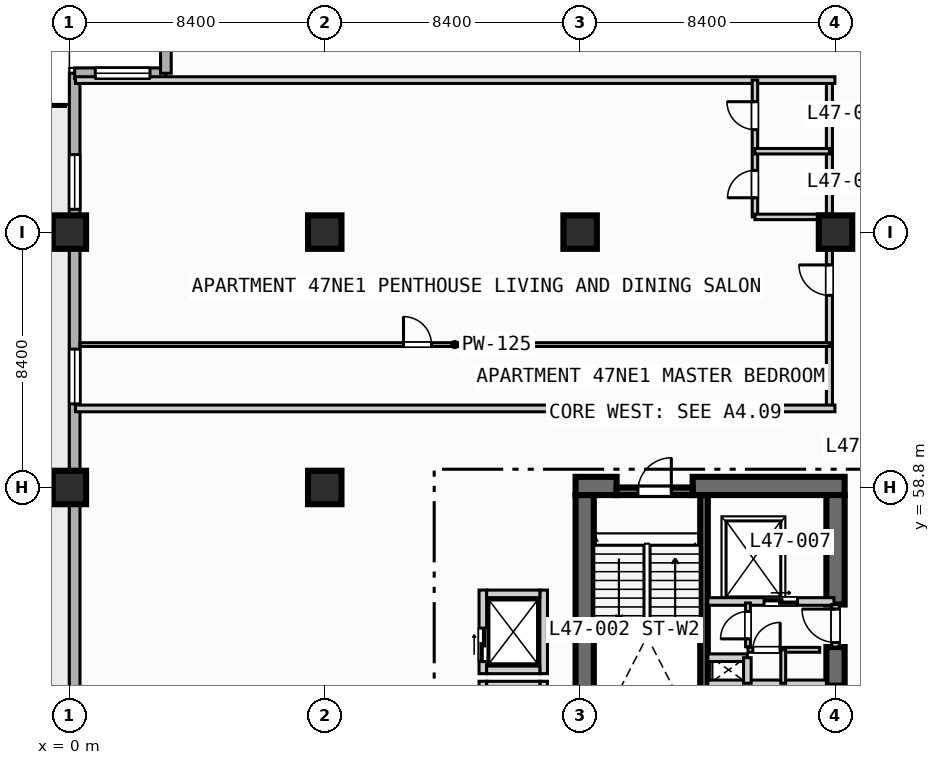
"""IFC4 building model, lengths in metres.
Left out: names, types, materials, properties, quantities, classifications, styles, units other than length and angle.
Written with IfcOpenShell. Run it as: python <this file> out.ifc"""

import sys

from ifc_helpers import new_model, si_unit, direction, frame, frame_2d, origin, origin_2d, place, context, subcontext, project, spatial, rectangle, extrude, element, fill, save


model = new_model("IFC4")
c1 = context("Model", 3, precision=1e-05, world=origin(), true_north=direction((0.0, 1.0)))
c2 = subcontext(c1, "Body", "Model", "MODEL_VIEW")
j1 = project(units=[si_unit("LENGTHUNIT", "METRE"), si_unit("PLANEANGLEUNIT", "RADIAN")], contexts=[c1])
p1 = place(None, origin())
s1 = spatial("IfcSite", under=j1, at=p1, CompositionType="ELEMENT")
p2 = place(p1, origin())
s2 = spatial("IfcBuilding", under=s1, at=p2, CompositionType="ELEMENT")
p3 = place(p2, frame((0.0, 0.0, 193.9)))
s3 = spatial("IfcBuildingStorey", under=s2, at=p3, CompositionType="ELEMENT", Elevation=193.9)
p4 = place(p3, frame((20.875, 50.5, 0.0), z_axis=(0.0, 0.0, 1.0), x_axis=(0.0, 1.0, 0.0)))
e1 = element("IfcWall", 1, at=p4, inside=s3, PredefinedType="SOLIDWALL", context=c2, shape_type="SweptSolid", body=[
    extrude(rectangle(XDim=8.05, YDim=0.25, at=frame_2d((4.025, 0.0))), origin(), (0.0, 0.0, 1.0), 3.47),
])
p5 = place(p3, frame((16.65, 58.85, 0.0), z_axis=(0.0, 0.0, 1.0), x_axis=(1.0, 0.0, 0.0)))
e2 = element("IfcWall", 2, at=p5, inside=s3, PredefinedType="SHEAR", context=c2, shape_type="SweptSolid", body=[
    extrude(rectangle(XDim=1.35, YDim=0.6, at=frame_2d((0.675, 0.0))), origin(), (0.0, 0.0, 1.0), 3.47),
])
p6 = place(p3, frame((20.5, 58.85, 0.0), z_axis=(0.0, 0.0, 1.0), x_axis=(1.0, 0.0, 0.0)))
e3 = element("IfcWall", 3, at=p6, inside=s3, PredefinedType="SHEAR", context=c2, shape_type="SweptSolid", body=[
    extrude(rectangle(XDim=5.0, YDim=0.6, at=frame_2d((2.5, 0.0))), origin(), (0.0, 0.0, 1.0), 3.47),
])
p7 = place(p3, frame((16.95, 42.2, 0.0), z_axis=(0.0, 0.0, 1.0), x_axis=(0.0, 1.0, 0.0)))
e4 = element("IfcWall", 4, at=p7, inside=s3, PredefinedType="SHEAR", context=c2, shape_type="SweptSolid", body=[
    extrude(rectangle(XDim=16.35, YDim=0.6, at=frame_2d((8.175, 0.0))), origin(), (0.0, 0.0, 1.0), 3.47),
])
p8 = place(p3, frame((25.2, 52.28, 0.0), z_axis=(0.0, 0.0, 1.0), x_axis=(0.0, 1.0, 0.0)))
e5 = element("IfcWall", 5, at=p8, inside=s3, PredefinedType="SHEAR", context=c2, shape_type="SweptSolid", body=[
    extrude(rectangle(XDim=1.27, YDim=0.6, at=frame_2d((0.635, 0.0))), origin(), (0.0, 0.0, 1.0), 3.47),
])
p9 = place(p3, frame((25.2, 54.95, 0.0), z_axis=(0.0, 0.0, 1.0), x_axis=(0.0, 1.0, 0.0)))
e6 = element("IfcWall", 6, at=p9, inside=s3, PredefinedType="SHEAR", context=c2, shape_type="SweptSolid", body=[
    extrude(rectangle(XDim=3.6, YDim=0.6, at=frame_2d((1.8, 0.0))), origin(), (0.0, 0.0, 1.0), 3.47),
])
for number, where, z_axis, x_axis in (
    (7, (0.0, 58.8, 0.0), (0.0, 0.0, 1.0), (1.0, 0.0, 0.0)),
    (8, (0.0, 67.2, 0.0), (0.0, 0.0, 1.0), (1.0, 0.0, 0.0)),
    (9, (8.4, 58.8, 0.0), (0.0, 0.0, 1.0), (1.0, 0.0, 0.0)),
    (10, (8.4, 67.2, 0.0), (0.0, 0.0, 1.0), (1.0, 0.0, 0.0)),
    (11, (16.8, 67.2, 0.0), (0.0, 0.0, 1.0), (1.0, 0.0, 0.0)),
    (12, (25.2, 67.2, 0.0), (0.0, 0.0, 1.0), (1.0, 0.0, 0.0)),
):
    element("IfcColumn", number, at=place(p3, frame(where, z_axis=z_axis, x_axis=x_axis)), inside=s3, PredefinedType="COLUMN", context=c2, shape_type="SweptSolid", body=[
        extrude(rectangle(XDim=1.1, YDim=1.1, at=origin_2d()), origin(), (0.0, 0.0, 1.0), 3.7),
    ])
p10 = place(p3, frame((0.175, 3.175, 0.0), z_axis=(0.0, 0.0, 1.0), x_axis=(0.0, 1.0, 0.0)))
e13 = element("IfcWall", 13, at=p10, inside=s3, PredefinedType="STANDARD", context=c2, shape_type="SweptSolid", body=[
    extrude(rectangle(XDim=69.25, YDim=0.35, at=frame_2d((34.625, 0.0))), origin(), (0.0, 0.0, 1.0), 3.47),
])
p11 = place(p10, frame((42.325, 0.0, 0.0)))
e14 = element("IfcOpeningElement", 14, at=p11, cuts=e13, PredefinedType="OPENING", context=c2, shape_type="SweptSolid", body=[
    extrude(rectangle(XDim=1.4, YDim=2.2, at=frame_2d((0.7, 1.1))), frame((0.0, 0.185, 0.0), z_axis=(0.0, -1.0, 0.0), x_axis=(1.0, 0.0, 0.0)), (0.0, 0.0, 1.0), 0.37),
])
p12 = place(p10, frame((25.025, 0.0, 0.85)))
e15 = element("IfcOpeningElement", 15, at=p12, cuts=e13, PredefinedType="OPENING", context=c2, shape_type="SweptSolid", body=[
    extrude(rectangle(XDim=2.4, YDim=1.95, at=frame_2d((1.2, 0.975))), frame((0.0, 0.185, 0.0), z_axis=(0.0, -1.0, 0.0), x_axis=(1.0, 0.0, 0.0)), (0.0, 0.0, 1.0), 0.37),
])
p13 = place(p10, frame((33.725, 0.0, 0.85)))
e16 = element("IfcOpeningElement", 16, at=p13, cuts=e13, PredefinedType="OPENING", context=c2, shape_type="SweptSolid", body=[
    extrude(rectangle(XDim=1.8, YDim=1.8, at=frame_2d((0.9, 0.9))), frame((0.0, 0.185, 0.0), z_axis=(0.0, -1.0, 0.0), x_axis=(1.0, 0.0, 0.0)), (0.0, 0.0, 1.0), 0.37),
])
p14 = place(p10, frame((58.375, 0.0, 0.85)))
e17 = element("IfcOpeningElement", 17, at=p14, cuts=e13, PredefinedType="OPENING", context=c2, shape_type="SweptSolid", body=[
    extrude(rectangle(XDim=1.8, YDim=1.8, at=frame_2d((0.9, 0.9))), frame((0.0, 0.185, 0.0), z_axis=(0.0, -1.0, 0.0), x_axis=(1.0, 0.0, 0.0)), (0.0, 0.0, 1.0), 0.37),
])
p15 = place(p10, frame((64.775, 0.0, 0.85)))
e18 = element("IfcOpeningElement", 18, at=p15, cuts=e13, PredefinedType="OPENING", context=c2, shape_type="SweptSolid", body=[
    extrude(rectangle(XDim=1.8, YDim=1.8, at=frame_2d((0.9, 0.9))), frame((0.0, 0.185, 0.0), z_axis=(0.0, -1.0, 0.0), x_axis=(1.0, 0.0, 0.0)), (0.0, 0.0, 1.0), 0.37),
])
p16 = place(p3, frame((0.175, 72.425, 0.0), z_axis=(0.0, 0.0, 1.0), x_axis=(1.0, 0.0, 0.0)))
e19 = element("IfcWall", 19, at=p16, inside=s3, PredefinedType="STANDARD", context=c2, shape_type="SweptSolid", body=[
    extrude(rectangle(XDim=3.0, YDim=0.35, at=frame_2d((1.5, 0.0))), origin(), (0.0, 0.0, 1.0), 3.47),
])
p17 = place(p16, frame((0.677, 0.0, 0.85)))
e20 = element("IfcOpeningElement", 20, at=p17, cuts=e19, PredefinedType="OPENING", context=c2, shape_type="SweptSolid", body=[
    extrude(rectangle(XDim=1.8, YDim=1.8, at=frame_2d((0.9, 0.9))), frame((0.0, 0.185, 0.0), z_axis=(0.0, -1.0, 0.0), x_axis=(1.0, 0.0, 0.0)), (0.0, 0.0, 1.0), 0.37),
])
p18 = place(p3, frame((3.175, 72.425, 0.0), z_axis=(0.0, 0.0, 1.0), x_axis=(0.0, 1.0, 0.0)))
e21 = element("IfcWall", 21, at=p18, inside=s3, PredefinedType="STANDARD", context=c2, shape_type="SweptSolid", body=[
    extrude(rectangle(XDim=3.0, YDim=0.35, at=frame_2d((1.5, 0.0))), origin(), (0.0, 0.0, 1.0), 3.47),
])
p19 = place(p3, frame((18.0, 58.675, 0.0), z_axis=(0.0, 0.0, 1.0), x_axis=(1.0, 0.0, 0.0)))
e22 = element("IfcWall", 22, at=p19, inside=s3, PredefinedType="SOLIDWALL", context=c2, shape_type="SweptSolid", body=[
    extrude(rectangle(XDim=2.5, YDim=0.25, at=frame_2d((1.25, 0.0))), origin(), (0.0, 0.0, 1.0), 3.47),
])
p20 = place(p19, frame((0.7, 0.0, 0.0)))
e23 = element("IfcOpeningElement", 23, at=p20, cuts=e22, PredefinedType="OPENING", context=c2, shape_type="SweptSolid", body=[
    extrude(rectangle(XDim=1.1, YDim=2.15, at=frame_2d((0.55, 1.075))), frame((0.0, 0.135, 0.0), z_axis=(0.0, -1.0, 0.0), x_axis=(1.0, 0.0, 0.0)), (0.0, 0.0, 1.0), 0.27),
])
p21 = place(p3, frame((21.0, 52.34, 0.0), z_axis=(0.0, 0.0, 1.0), x_axis=(1.0, 0.0, 0.0)))
e24 = element("IfcWall", 24, at=p21, inside=s3, PredefinedType="SOLIDWALL", context=c2, shape_type="SweptSolid", body=[
    extrude(rectangle(XDim=3.9, YDim=0.25, at=frame_2d((1.95, 0.0))), origin(), (0.0, 0.0, 1.0), 3.47),
])
p22 = place(p3, frame((21.0, 55.05, 0.0), z_axis=(0.0, 0.0, 1.0), x_axis=(1.0, 0.0, 0.0)))
e25 = element("IfcWall", 25, at=p22, inside=s3, PredefinedType="SOLIDWALL", context=c2, shape_type="SweptSolid", body=[
    extrude(rectangle(XDim=4.15, YDim=0.25, at=frame_2d((2.075, 0.0))), origin(), (0.0, 0.0, 1.0), 3.47),
])
p23 = place(p22, frame((1.85, 0.0, 0.0)))
e26 = element("IfcOpeningElement", 26, at=p23, cuts=e25, PredefinedType="OPENING", context=c2, shape_type="SweptSolid", body=[
    extrude(rectangle(XDim=1.1, YDim=2.15, at=frame_2d((0.55, 1.075))), frame((0.0, 0.135, 0.0), z_axis=(0.0, -1.0, 0.0), x_axis=(1.0, 0.0, 0.0)), (0.0, 0.0, 1.0), 0.27),
])
p24 = place(p3, frame((25.2, 53.55, 0.0), z_axis=(0.0, 0.0, 1.0), x_axis=(0.0, 1.0, 0.0)))
e27 = element("IfcWall", 27, at=p24, inside=s3, PredefinedType="SOLIDWALL", context=c2, shape_type="SweptSolid", body=[
    extrude(rectangle(XDim=1.4, YDim=0.25, at=frame_2d((0.7, 0.0))), origin(), (0.0, 0.0, 1.0), 3.47),
])
p25 = place(p24, frame((0.15, 0.0, 0.0)))
e28 = element("IfcOpeningElement", 28, at=p25, cuts=e27, PredefinedType="OPENING", context=c2, shape_type="SweptSolid", body=[
    extrude(rectangle(XDim=1.1, YDim=2.15, at=frame_2d((0.55, 1.075))), frame((0.0, 0.135, 0.0), z_axis=(0.0, -1.0, 0.0), x_axis=(1.0, 0.0, 0.0)), (0.0, 0.0, 1.0), 0.27),
])
p26 = place(p3, frame((21.0, 53.2, 0.0), z_axis=(0.0, 0.0, 1.0), x_axis=(1.0, 0.0, 0.0)))
e29 = element("IfcWall", 29, at=p26, inside=s3, PredefinedType="SOLIDWALL", context=c2, shape_type="SweptSolid", body=[
    extrude(rectangle(XDim=1.3, YDim=0.25, at=frame_2d((0.65, 0.0))), origin(), (0.0, 0.0, 1.0), 3.47),
])
p27 = place(p3, frame((22.3, 52.36, 0.0), z_axis=(0.0, 0.0, 1.0), x_axis=(0.0, 1.0, 0.0)))
e30 = element("IfcWall", 30, at=p27, inside=s3, PredefinedType="SOLIDWALL", context=c2, shape_type="SweptSolid", body=[
    extrude(rectangle(XDim=0.84, YDim=0.25, at=frame_2d((0.42, 0.0))), origin(), (0.0, 0.0, 1.0), 3.47),
])
p28 = place(p3, frame((22.32, 53.56, 0.0), z_axis=(0.0, 0.0, 1.0), x_axis=(0.0, 1.0, 0.0)))
e31 = element("IfcWall", 31, at=p28, inside=s3, PredefinedType="PARTITIONING", context=c2, shape_type="SweptSolid", body=[
    extrude(rectangle(XDim=1.44, YDim=0.16, at=frame_2d((0.72, 0.0))), origin(), (0.0, 0.0, 1.0), 3.47),
])
p29 = place(p28, frame((0.26, 0.0, 0.0)))
e32 = element("IfcOpeningElement", 32, at=p29, cuts=e31, PredefinedType="OPENING", context=c2, shape_type="SweptSolid", body=[
    extrude(rectangle(XDim=0.9, YDim=2.1, at=frame_2d((0.45, 1.05))), frame((0.0, 0.09, 0.0), z_axis=(0.0, -1.0, 0.0), x_axis=(1.0, 0.0, 0.0)), (0.0, 0.0, 1.0), 0.18),
])
p30 = place(p3, frame((22.32, 53.46, 0.0), z_axis=(0.0, 0.0, 1.0), x_axis=(1.0, 0.0, 0.0)))
e33 = element("IfcWall", 33, at=p30, inside=s3, PredefinedType="PARTITIONING", context=c2, shape_type="SweptSolid", body=[
    extrude(rectangle(XDim=2.36, YDim=0.16, at=frame_2d((1.18, 0.0))), origin(), (0.0, 0.0, 1.0), 3.47),
])
p31 = place(p30, frame((0.16, 0.0, 0.0)))
e34 = element("IfcOpeningElement", 34, at=p31, cuts=e33, PredefinedType="OPENING", context=c2, shape_type="SweptSolid", body=[
    extrude(rectangle(XDim=0.9, YDim=2.1, at=frame_2d((0.45, 1.05))), frame((0.0, 0.09, 0.0), z_axis=(0.0, -1.0, 0.0), x_axis=(1.0, 0.0, 0.0)), (0.0, 0.0, 1.0), 0.18),
])
p32 = place(p3, frame((23.48, 52.36, 0.0), z_axis=(0.0, 0.0, 1.0), x_axis=(0.0, 1.0, 0.0)))
e35 = element("IfcWall", 35, at=p32, inside=s3, PredefinedType="PARTITIONING", context=c2, shape_type="SweptSolid", body=[
    extrude(rectangle(XDim=1.1, YDim=0.16, at=frame_2d((0.55, 0.0))), origin(), (0.0, 0.0, 1.0), 3.47),
])
p33 = place(p3, frame((13.6, 49.675, 0.0), z_axis=(0.0, 0.0, 1.0), x_axis=(0.0, 1.0, 0.0)))
e36 = element("IfcWall", 36, at=p33, inside=s3, PredefinedType="SOLIDWALL", context=c2, shape_type="SweptSolid", body=[
    extrude(rectangle(XDim=2.75, YDim=0.25, at=frame_2d((1.375, 0.0))), origin(), (0.0, 0.0, 1.0), 3.47),
])
p34 = place(p33, frame((0.4, 0.0, 0.0)))
e37 = element("IfcOpeningElement", 37, at=p34, cuts=e36, PredefinedType="OPENING", context=c2, shape_type="SweptSolid", body=[
    extrude(rectangle(XDim=1.1, YDim=2.15, at=frame_2d((0.55, 1.075))), frame((0.0, 0.135, 0.0), z_axis=(0.0, -1.0, 0.0), x_axis=(1.0, 0.0, 0.0)), (0.0, 0.0, 1.0), 0.27),
])
p35 = place(p3, frame((15.6, 49.675, 0.0), z_axis=(0.0, 0.0, 1.0), x_axis=(0.0, 1.0, 0.0)))
e38 = element("IfcWall", 38, at=p35, inside=s3, PredefinedType="SOLIDWALL", context=c2, shape_type="SweptSolid", body=[
    extrude(rectangle(XDim=2.75, YDim=0.25, at=frame_2d((1.375, 0.0))), origin(), (0.0, 0.0, 1.0), 3.47),
])
p36 = place(p3, frame((13.725, 52.3, 0.0), z_axis=(0.0, 0.0, 1.0), x_axis=(1.0, 0.0, 0.0)))
e39 = element("IfcWall", 39, at=p36, inside=s3, PredefinedType="SOLIDWALL", context=c2, shape_type="SweptSolid", body=[
    extrude(rectangle(XDim=1.75, YDim=0.25, at=frame_2d((0.875, 0.0))), origin(), (0.0, 0.0, 1.0), 3.47),
])
p37 = place(p3, frame((13.6, 52.675, 0.0), z_axis=(0.0, 0.0, 1.0), x_axis=(0.0, 1.0, 0.0)))
e40 = element("IfcWall", 40, at=p37, inside=s3, PredefinedType="SOLIDWALL", context=c2, shape_type="SweptSolid", body=[
    extrude(rectangle(XDim=2.75, YDim=0.25, at=frame_2d((1.375, 0.0))), origin(), (0.0, 0.0, 1.0), 3.47),
])
p38 = place(p37, frame((0.4, 0.0, 0.0)))
e41 = element("IfcOpeningElement", 41, at=p38, cuts=e40, PredefinedType="OPENING", context=c2, shape_type="SweptSolid", body=[
    extrude(rectangle(XDim=1.1, YDim=2.15, at=frame_2d((0.55, 1.075))), frame((0.0, 0.135, 0.0), z_axis=(0.0, -1.0, 0.0), x_axis=(1.0, 0.0, 0.0)), (0.0, 0.0, 1.0), 0.27),
])
p39 = place(p3, frame((15.6, 52.675, 0.0), z_axis=(0.0, 0.0, 1.0), x_axis=(0.0, 1.0, 0.0)))
e42 = element("IfcWall", 42, at=p39, inside=s3, PredefinedType="SOLIDWALL", context=c2, shape_type="SweptSolid", body=[
    extrude(rectangle(XDim=2.75, YDim=0.25, at=frame_2d((1.375, 0.0))), origin(), (0.0, 0.0, 1.0), 3.47),
])
for number, where, z_axis, x_axis in (
    (43, (13.725, 52.8, 0.0), (0.0, 0.0, 1.0), (1.0, 0.0, 0.0)),
    (44, (13.725, 55.3, 0.0), (0.0, 0.0, 1.0), (1.0, 0.0, 0.0)),
):
    element("IfcWall", number, at=place(p3, frame(where, z_axis=z_axis, x_axis=x_axis)), inside=s3, PredefinedType="SOLIDWALL", context=c2, shape_type="SweptSolid", body=[
        extrude(rectangle(XDim=1.75, YDim=0.25, at=frame_2d((0.875, 0.0))), origin(), (0.0, 0.0, 1.0), 3.47),
    ])
p40 = place(p3, frame((25.0, 61.4, 0.0), z_axis=(0.0, 0.0, 1.0), x_axis=(0.0, 1.0, 0.0)))
e45 = element("IfcWall", 45, at=p40, inside=s3, PredefinedType="PARTITIONING", context=c2, shape_type="SweptSolid", body=[
    extrude(rectangle(XDim=10.8, YDim=0.2, at=frame_2d((5.4, 0.0))), origin(), (0.0, 0.0, 1.0), 2.82),
])
p41 = place(p40, frame((3.72, 0.0, 0.0)))
e46 = element("IfcOpeningElement", 46, at=p41, cuts=e45, PredefinedType="OPENING", context=c2, shape_type="SweptSolid", body=[
    extrude(rectangle(XDim=1.0, YDim=2.15, at=frame_2d((0.5, 1.075))), frame((0.0, 0.11, 0.0), z_axis=(0.0, -1.0, 0.0), x_axis=(1.0, 0.0, 0.0)), (0.0, 0.0, 1.0), 0.22),
])
for number, where, z_axis, x_axis in (
    (47, (0.2, 61.4, 0.0), (0.0, 0.0, 1.0), (1.0, 0.0, 0.0)),
    (48, (0.2, 72.2, 0.0), (0.0, 0.0, 1.0), (1.0, 0.0, 0.0)),
):
    element("IfcWall", number, at=place(p3, frame(where, z_axis=z_axis, x_axis=x_axis)), inside=s3, PredefinedType="PARTITIONING", context=c2, shape_type="SweptSolid", body=[
        extrude(rectangle(XDim=24.98, YDim=0.22, at=frame_2d((12.49, 0.0))), origin(), (0.0, 0.0, 1.0), 3.47),
    ])
p42 = place(p3, frame((22.55, 67.7, 0.0), z_axis=(0.0, 0.0, 1.0), x_axis=(0.0, 1.0, 0.0)))
e49 = element("IfcWall", 49, at=p42, inside=s3, PredefinedType="PLUMBINGWALL", context=c2, shape_type="SweptSolid", body=[
    extrude(rectangle(XDim=4.5, YDim=0.18, at=frame_2d((2.25, 0.0))), origin(), (0.0, 0.0, 1.0), 3.47),
])
p43 = place(p42, frame((0.63, 0.0, 0.0)))
e50 = element("IfcOpeningElement", 50, at=p43, cuts=e49, PredefinedType="OPENING", context=c2, shape_type="SweptSolid", body=[
    extrude(rectangle(XDim=0.9, YDim=2.1, at=frame_2d((0.45, 1.05))), frame((0.0, 0.1, 0.0), z_axis=(0.0, -1.0, 0.0), x_axis=(1.0, 0.0, 0.0)), (0.0, 0.0, 1.0), 0.2),
])
p44 = place(p42, frame((2.87, 0.0, 0.0)))
e51 = element("IfcOpeningElement", 51, at=p44, cuts=e49, PredefinedType="OPENING", context=c2, shape_type="SweptSolid", body=[
    extrude(rectangle(XDim=0.92, YDim=2.1, at=frame_2d((0.46, 1.05))), frame((0.0, 0.1, 0.0), z_axis=(0.0, -1.0, 0.0), x_axis=(1.0, 0.0, 0.0)), (0.0, 0.0, 1.0), 0.2),
])
for number, where, z_axis, x_axis in (
    (52, (22.55, 67.7, 0.0), (0.0, 0.0, 1.0), (1.0, 0.0, 0.0)),
    (53, (22.55, 69.86, 0.0), (0.0, 0.0, 1.0), (1.0, 0.0, 0.0)),
):
    element("IfcWall", number, at=place(p3, frame(where, z_axis=z_axis, x_axis=x_axis)), inside=s3, PredefinedType="PLUMBINGWALL", context=c2, shape_type="SweptSolid", body=[
        extrude(rectangle(XDim=2.45, YDim=0.18, at=frame_2d((1.225, 0.0))), origin(), (0.0, 0.0, 1.0), 3.47),
    ])
p45 = place(p3, frame((0.35, 63.5, 0.0), z_axis=(0.0, 0.0, 1.0), x_axis=(1.0, 0.0, 0.0)))
e54 = element("IfcWall", 54, at=p45, inside=s3, PredefinedType="PARTITIONING", context=c2, shape_type="SweptSolid", body=[
    extrude(rectangle(XDim=24.65, YDim=0.125, at=frame_2d((12.325, 0.0))), origin(), (0.0, 0.0, 1.0), 3.47),
])
p46 = place(p45, frame((10.64, 0.0, 0.0)))
e55 = element("IfcOpeningElement", 55, at=p46, cuts=e54, PredefinedType="OPENING", context=c2, shape_type="SweptSolid", body=[
    extrude(rectangle(XDim=0.92, YDim=2.1, at=frame_2d((0.46, 1.05))), frame((0.0, 0.073, 0.0), z_axis=(0.0, -1.0, 0.0), x_axis=(1.0, 0.0, 0.0)), (0.0, 0.0, 1.0), 0.145),
])
p47 = place(p14, origin())
e56 = element("IfcWindow", 56, at=p47, inside=s3, PartitioningType="SINGLE_PANEL", PredefinedType="WINDOW", context=c2, shape_type="SweptSolid", body=[
    extrude(rectangle(XDim=1.8, YDim=1.8, at=frame_2d((0.9, 0.9))), frame((0.0, 0.03, 0.0), z_axis=(0.0, -1.0, 0.0), x_axis=(1.0, 0.0, 0.0)), (0.0, 0.0, 1.0), 0.06),
])
fill(e17, e56)
p48 = place(p15, origin())
e57 = element("IfcWindow", 57, at=p48, inside=s3, PartitioningType="SINGLE_PANEL", PredefinedType="WINDOW", context=c2, shape_type="SweptSolid", body=[
    extrude(rectangle(XDim=1.8, YDim=1.8, at=frame_2d((0.9, 0.9))), frame((0.0, 0.03, 0.0), z_axis=(0.0, -1.0, 0.0), x_axis=(1.0, 0.0, 0.0)), (0.0, 0.0, 1.0), 0.06),
])
fill(e18, e57)
p49 = place(p17, origin())
e58 = element("IfcWindow", 58, at=p49, inside=s3, PartitioningType="SINGLE_PANEL", PredefinedType="WINDOW", context=c2, shape_type="SweptSolid", body=[
    extrude(rectangle(XDim=1.8, YDim=1.8, at=frame_2d((0.9, 0.9))), frame((0.0, 0.03, 0.0), z_axis=(0.0, -1.0, 0.0), x_axis=(1.0, 0.0, 0.0)), (0.0, 0.0, 1.0), 0.06),
])
fill(e20, e58)
p50 = place(p20, origin())
e59 = element("IfcDoor", 59, at=p50, inside=s3, OperationType="SINGLE_SWING_RIGHT", PredefinedType="DOOR", context=c2, shape_type="SweptSolid", body=[
    extrude(rectangle(XDim=1.1, YDim=2.15, at=frame_2d((0.55, 1.075))), frame((0.0, 0.025, 0.0), z_axis=(0.0, -1.0, 0.0), x_axis=(1.0, 0.0, 0.0)), (0.0, 0.0, 1.0), 0.05),
])
fill(e23, e59)
p51 = place(p23, origin())
e60 = element("IfcDoor", 60, at=p51, inside=s3, OperationType="SLIDING_TO_LEFT", PredefinedType="DOOR", context=c2, shape_type="SweptSolid", body=[
    extrude(rectangle(XDim=1.1, YDim=2.15, at=frame_2d((0.55, 1.075))), frame((0.0, 0.025, 0.0), z_axis=(0.0, -1.0, 0.0), x_axis=(1.0, 0.0, 0.0)), (0.0, 0.0, 1.0), 0.05),
])
fill(e26, e60)
p52 = place(p25, origin())
e61 = element("IfcDoor", 61, at=p52, inside=s3, OperationType="SINGLE_SWING_RIGHT", PredefinedType="DOOR", context=c2, shape_type="SweptSolid", body=[
    extrude(rectangle(XDim=1.1, YDim=2.15, at=frame_2d((0.55, 1.075))), frame((0.0, 0.025, 0.0), z_axis=(0.0, -1.0, 0.0), x_axis=(1.0, 0.0, 0.0)), (0.0, 0.0, 1.0), 0.05),
])
fill(e28, e61)
p53 = place(p29, origin())
e62 = element("IfcDoor", 62, at=p53, inside=s3, OperationType="SINGLE_SWING_LEFT", PredefinedType="DOOR", context=c2, shape_type="SweptSolid", body=[
    extrude(rectangle(XDim=0.9, YDim=2.1, at=frame_2d((0.45, 1.05))), frame((0.0, 0.025, 0.0), z_axis=(0.0, -1.0, 0.0), x_axis=(1.0, 0.0, 0.0)), (0.0, 0.0, 1.0), 0.05),
])
fill(e32, e62)
p54 = place(p31, origin())
e63 = element("IfcDoor", 63, at=p54, inside=s3, OperationType="SINGLE_SWING_RIGHT", PredefinedType="DOOR", context=c2, shape_type="SweptSolid", body=[
    extrude(rectangle(XDim=0.9, YDim=2.1, at=frame_2d((0.45, 1.05))), frame((0.0, 0.025, 0.0), z_axis=(0.0, -1.0, 0.0), x_axis=(1.0, 0.0, 0.0)), (0.0, 0.0, 1.0), 0.05),
])
fill(e34, e63)
p55 = place(p38, origin())
e64 = element("IfcDoor", 64, at=p55, inside=s3, OperationType="SLIDING_TO_LEFT", PredefinedType="DOOR", context=c2, shape_type="SweptSolid", body=[
    extrude(rectangle(XDim=1.1, YDim=2.15, at=frame_2d((0.55, 1.075))), frame((0.0, 0.025, 0.0), z_axis=(0.0, -1.0, 0.0), x_axis=(1.0, 0.0, 0.0)), (0.0, 0.0, 1.0), 0.05),
])
fill(e41, e64)
p56 = place(p41, origin())
e65 = element("IfcDoor", 65, at=p56, inside=s3, OperationType="SINGLE_SWING_RIGHT", PredefinedType="DOOR", context=c2, shape_type="SweptSolid", body=[
    extrude(rectangle(XDim=1.0, YDim=2.15, at=frame_2d((0.5, 1.075))), frame((0.0, 0.025, 0.0), z_axis=(0.0, -1.0, 0.0), x_axis=(1.0, 0.0, 0.0)), (0.0, 0.0, 1.0), 0.05),
])
fill(e46, e65)
p57 = place(p43, origin())
e66 = element("IfcDoor", 66, at=p57, inside=s3, OperationType="SINGLE_SWING_LEFT", PredefinedType="DOOR", context=c2, shape_type="SweptSolid", body=[
    extrude(rectangle(XDim=0.9, YDim=2.1, at=frame_2d((0.45, 1.05))), frame((0.0, 0.025, 0.0), z_axis=(0.0, -1.0, 0.0), x_axis=(1.0, 0.0, 0.0)), (0.0, 0.0, 1.0), 0.05),
])
fill(e50, e66)
p58 = place(p44, origin())
e67 = element("IfcDoor", 67, at=p58, inside=s3, OperationType="SINGLE_SWING_RIGHT", PredefinedType="DOOR", context=c2, shape_type="SweptSolid", body=[
    extrude(rectangle(XDim=0.92, YDim=2.1, at=frame_2d((0.46, 1.05))), frame((0.0, 0.025, 0.0), z_axis=(0.0, -1.0, 0.0), x_axis=(1.0, 0.0, 0.0)), (0.0, 0.0, 1.0), 0.05),
])
fill(e51, e67)
p59 = place(p46, origin())
e68 = element("IfcDoor", 68, at=p59, inside=s3, OperationType="SINGLE_SWING_LEFT", PredefinedType="DOOR", context=c2, shape_type="SweptSolid", body=[
    extrude(rectangle(XDim=0.92, YDim=2.1, at=frame_2d((0.46, 1.05))), frame((0.0, 0.025, 0.0), z_axis=(0.0, -1.0, 0.0), x_axis=(1.0, 0.0, 0.0)), (0.0, 0.0, 1.0), 0.05),
])
fill(e55, e68)
save(model, sys.argv[1])
